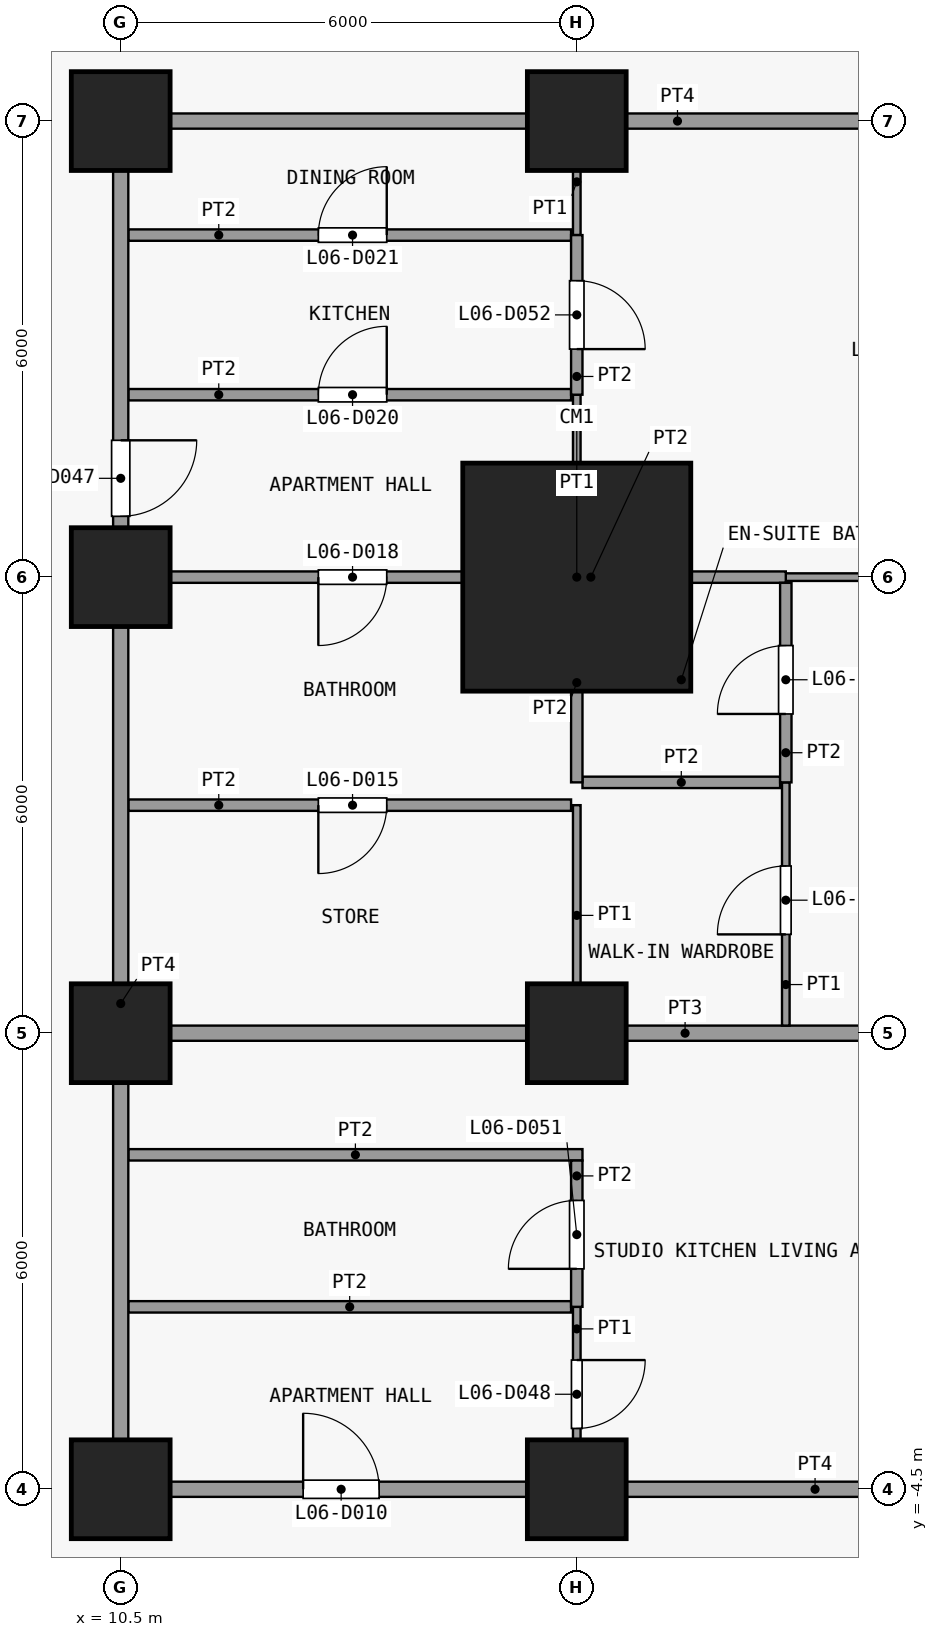
"""IFC4 building model, lengths in metres.
Left out: names, types, materials, properties, quantities, classifications, styles, units other than length and angle.
Written with IfcOpenShell. Run it as: python <this file> out.ifc"""

import sys

from ifc_helpers import new_model, si_unit, direction, frame, frame_2d, origin, origin_2d, place, context, subcontext, project, spatial, rectangle, extrude, element, fill, save


model = new_model("IFC4")
c1 = context("Model", 3, precision=1e-05, world=origin(), true_north=direction((0.0, 1.0)))
c2 = subcontext(c1, "Body", "Model", "MODEL_VIEW")
j1 = project(units=[si_unit("LENGTHUNIT", "METRE"), si_unit("PLANEANGLEUNIT", "RADIAN")], contexts=[c1])
p1 = place(None, origin())
s1 = spatial("IfcSite", under=j1, at=p1, CompositionType="ELEMENT")
p2 = place(p1, origin())
s2 = spatial("IfcBuilding", under=s1, at=p2, CompositionType="ELEMENT")
p3 = place(p2, frame((0.0, 0.0, 32.5)))
s3 = spatial("IfcBuildingStorey", under=s2, at=p3, CompositionType="ELEMENT", Elevation=32.5)
for number, where, z_axis, x_axis in (
    (1, (10.5, -4.5, 0.0), (0.0, 0.0, 1.0), (1.0, 0.0, 0.0)),
    (2, (10.5, 1.5, 0.0), (0.0, 0.0, 1.0), (1.0, 0.0, 0.0)),
    (3, (10.5, 7.5, 0.0), (0.0, 0.0, 1.0), (1.0, 0.0, 0.0)),
    (4, (10.5, 13.5, 0.0), (0.0, 0.0, 1.0), (1.0, 0.0, 0.0)),
    (5, (16.5, -4.5, 0.0), (0.0, 0.0, 1.0), (1.0, 0.0, 0.0)),
    (6, (16.5, 1.5, 0.0), (0.0, 0.0, 1.0), (1.0, 0.0, 0.0)),
):
    element("IfcColumn", number, at=place(p3, frame(where, z_axis=z_axis, x_axis=x_axis)), inside=s3, PredefinedType="COLUMN", context=c2, shape_type="SweptSolid", body=[
        extrude(rectangle(XDim=1.3, YDim=1.3, at=origin_2d()), origin(), (0.0, 0.0, 1.0), 3.6),
    ])
p4 = place(p3, frame((16.5, 7.5, 0.0), z_axis=(0.0, 0.0, 1.0), x_axis=(1.0, 0.0, 0.0)))
e7 = element("IfcColumn", 7, at=p4, inside=s3, PredefinedType="COLUMN", context=c2, shape_type="SweptSolid", body=[
    extrude(rectangle(XDim=3.0, YDim=3.0, at=origin_2d()), origin(), (0.0, 0.0, 1.0), 3.6),
])
p5 = place(p3, frame((16.5, 13.5, 0.0), z_axis=(0.0, 0.0, 1.0), x_axis=(1.0, 0.0, 0.0)))
e8 = element("IfcColumn", 8, at=p5, inside=s3, PredefinedType="COLUMN", context=c2, shape_type="SweptSolid", body=[
    extrude(rectangle(XDim=1.3, YDim=1.3, at=origin_2d()), origin(), (0.0, 0.0, 1.0), 3.6),
])
p6 = place(p3, frame((10.4, -4.5, 0.0), z_axis=(0.0, 0.0, 1.0), x_axis=(1.0, 0.0, 0.0)))
e9 = element("IfcWall", 9, at=p6, inside=s3, PredefinedType="PARTITIONING", context=c2, shape_type="SweptSolid", body=[
    extrude(rectangle(XDim=14.85, YDim=0.2, at=frame_2d((7.425, 0.0))), origin(), (0.0, 0.0, 1.0), 3.3),
])
p7 = place(p6, frame((2.5, 0.0, 0.0)))
e10 = element("IfcOpeningElement", 10, at=p7, cuts=e9, PredefinedType="OPENING", context=c2, shape_type="SweptSolid", body=[
    extrude(rectangle(XDim=1.0, YDim=2.1, at=frame_2d((0.5, 1.05))), frame((0.0, 0.11, 0.0), z_axis=(0.0, -1.0, 0.0), x_axis=(1.0, 0.0, 0.0)), (0.0, 0.0, 1.0), 0.22),
])
p8 = place(p3, frame((10.6, -2.1, 0.0), z_axis=(0.0, 0.0, 1.0), x_axis=(1.0, 0.0, 0.0)))
e11 = element("IfcWall", 11, at=p8, inside=s3, PredefinedType="PARTITIONING", context=c2, shape_type="SweptSolid", body=[
    extrude(rectangle(XDim=5.825, YDim=0.15, at=frame_2d((2.913, 0.0))), origin(), (0.0, 0.0, 1.0), 3.3),
])
p9 = place(p3, frame((10.6, -0.1, 0.0), z_axis=(0.0, 0.0, 1.0), x_axis=(1.0, 0.0, 0.0)))
e12 = element("IfcWall", 12, at=p9, inside=s3, PredefinedType="PARTITIONING", context=c2, shape_type="SweptSolid", body=[
    extrude(rectangle(XDim=5.975, YDim=0.15, at=frame_2d((2.987, 0.0))), origin(), (0.0, 0.0, 1.0), 3.3),
])
p10 = place(p3, frame((10.6, 1.5, 0.0), z_axis=(0.0, 0.0, 1.0), x_axis=(1.0, 0.0, 0.0)))
e13 = element("IfcWall", 13, at=p10, inside=s3, PredefinedType="PARTITIONING", context=c2, shape_type="SweptSolid", body=[
    extrude(rectangle(XDim=14.65, YDim=0.2, at=frame_2d((7.325, 0.0))), origin(), (0.0, 0.0, 1.0), 3.3),
])
p11 = place(p3, frame((10.6, 4.5, 0.0), z_axis=(0.0, 0.0, 1.0), x_axis=(1.0, 0.0, 0.0)))
e14 = element("IfcWall", 14, at=p11, inside=s3, PredefinedType="PARTITIONING", context=c2, shape_type="SweptSolid", body=[
    extrude(rectangle(XDim=5.825, YDim=0.15, at=frame_2d((2.913, 0.0))), origin(), (0.0, 0.0, 1.0), 3.3),
])
p12 = place(p11, frame((2.5, 0.0, 0.0)))
e15 = element("IfcOpeningElement", 15, at=p12, cuts=e14, PredefinedType="OPENING", context=c2, shape_type="SweptSolid", body=[
    extrude(rectangle(XDim=0.9, YDim=2.1, at=frame_2d((0.45, 1.05))), frame((0.0, 0.085, 0.0), z_axis=(0.0, -1.0, 0.0), x_axis=(1.0, 0.0, 0.0)), (0.0, 0.0, 1.0), 0.17),
])
p13 = place(p3, frame((16.575, 4.8, 0.0), z_axis=(0.0, 0.0, 1.0), x_axis=(1.0, 0.0, 0.0)))
e16 = element("IfcWall", 16, at=p13, inside=s3, PredefinedType="PARTITIONING", context=c2, shape_type="SweptSolid", body=[
    extrude(rectangle(XDim=2.6, YDim=0.15, at=frame_2d((1.3, 0.0))), origin(), (0.0, 0.0, 1.0), 3.3),
])
p14 = place(p3, frame((19.25, 7.5, 0.0), z_axis=(0.0, 0.0, 1.0), x_axis=(1.0, 0.0, 0.0)))
e17 = element("IfcWall", 17, at=p14, inside=s3, PredefinedType="PARTITIONING", context=c2, shape_type="SweptSolid", body=[
    extrude(rectangle(XDim=6.0, YDim=0.1, at=frame_2d((3.0, 0.0))), origin(), (0.0, 0.0, 1.0), 3.3),
])
p15 = place(p14, frame((1.7, 0.0, 0.0)))
e18 = element("IfcOpeningElement", 18, at=p15, cuts=e17, PredefinedType="OPENING", context=c2, shape_type="SweptSolid", body=[
    extrude(rectangle(XDim=0.9, YDim=2.1, at=frame_2d((0.45, 1.05))), frame((0.0, 0.06, 0.0), z_axis=(0.0, -1.0, 0.0), x_axis=(1.0, 0.0, 0.0)), (0.0, 0.0, 1.0), 0.12),
])
p16 = place(p3, frame((10.6, 7.5, 0.0), z_axis=(0.0, 0.0, 1.0), x_axis=(1.0, 0.0, 0.0)))
e19 = element("IfcWall", 19, at=p16, inside=s3, PredefinedType="PARTITIONING", context=c2, shape_type="SweptSolid", body=[
    extrude(rectangle(XDim=8.65, YDim=0.15, at=frame_2d((4.325, 0.0))), origin(), (0.0, 0.0, 1.0), 3.3),
])
p17 = place(p16, frame((2.5, 0.0, 0.0)))
e20 = element("IfcOpeningElement", 20, at=p17, cuts=e19, PredefinedType="OPENING", context=c2, shape_type="SweptSolid", body=[
    extrude(rectangle(XDim=0.9, YDim=2.1, at=frame_2d((0.45, 1.05))), frame((0.0, 0.085, 0.0), z_axis=(0.0, -1.0, 0.0), x_axis=(1.0, 0.0, 0.0)), (0.0, 0.0, 1.0), 0.17),
])
p18 = place(p3, frame((10.6, 9.9, 0.0), z_axis=(0.0, 0.0, 1.0), x_axis=(1.0, 0.0, 0.0)))
e21 = element("IfcWall", 21, at=p18, inside=s3, PredefinedType="PARTITIONING", context=c2, shape_type="SweptSolid", body=[
    extrude(rectangle(XDim=5.825, YDim=0.15, at=frame_2d((2.913, 0.0))), origin(), (0.0, 0.0, 1.0), 3.3),
])
p19 = place(p18, frame((2.5, 0.0, 0.0)))
e22 = element("IfcOpeningElement", 22, at=p19, cuts=e21, PredefinedType="OPENING", context=c2, shape_type="SweptSolid", body=[
    extrude(rectangle(XDim=0.9, YDim=2.1, at=frame_2d((0.45, 1.05))), frame((0.0, 0.085, 0.0), z_axis=(0.0, -1.0, 0.0), x_axis=(1.0, 0.0, 0.0)), (0.0, 0.0, 1.0), 0.17),
])
p20 = place(p3, frame((10.6, 12.0, 0.0), z_axis=(0.0, 0.0, 1.0), x_axis=(1.0, 0.0, 0.0)))
e23 = element("IfcWall", 23, at=p20, inside=s3, PredefinedType="PARTITIONING", context=c2, shape_type="SweptSolid", body=[
    extrude(rectangle(XDim=5.825, YDim=0.15, at=frame_2d((2.913, 0.0))), origin(), (0.0, 0.0, 1.0), 3.3),
])
p21 = place(p20, frame((2.5, 0.0, 0.0)))
e24 = element("IfcOpeningElement", 24, at=p21, cuts=e23, PredefinedType="OPENING", context=c2, shape_type="SweptSolid", body=[
    extrude(rectangle(XDim=0.9, YDim=2.1, at=frame_2d((0.45, 1.05))), frame((0.0, 0.085, 0.0), z_axis=(0.0, -1.0, 0.0), x_axis=(1.0, 0.0, 0.0)), (0.0, 0.0, 1.0), 0.17),
])
p22 = place(p3, frame((10.4, 13.5, 0.0), z_axis=(0.0, 0.0, 1.0), x_axis=(1.0, 0.0, 0.0)))
e25 = element("IfcWall", 25, at=p22, inside=s3, PredefinedType="PARTITIONING", context=c2, shape_type="SweptSolid", body=[
    extrude(rectangle(XDim=14.85, YDim=0.2, at=frame_2d((7.425, 0.0))), origin(), (0.0, 0.0, 1.0), 3.3),
])
p23 = place(p3, frame((10.5, -4.4, 0.0), z_axis=(0.0, 0.0, 1.0), x_axis=(0.0, 1.0, 0.0)))
e26 = element("IfcWall", 26, at=p23, inside=s3, PredefinedType="PARTITIONING", context=c2, shape_type="SweptSolid", body=[
    extrude(rectangle(XDim=17.8, YDim=0.2, at=frame_2d((8.9, 0.0))), origin(), (0.0, 0.0, 1.0), 3.3),
])
p24 = place(p23, frame((12.7, 0.0, 0.0)))
e27 = element("IfcOpeningElement", 27, at=p24, cuts=e26, PredefinedType="OPENING", context=c2, shape_type="SweptSolid", body=[
    extrude(rectangle(XDim=1.0, YDim=2.1, at=frame_2d((0.5, 1.05))), frame((0.0, 0.11, 0.0), z_axis=(0.0, -1.0, 0.0), x_axis=(1.0, 0.0, 0.0)), (0.0, 0.0, 1.0), 0.22),
])
p25 = place(p3, frame((16.5, -4.4, 0.0), z_axis=(0.0, 0.0, 1.0), x_axis=(0.0, 1.0, 0.0)))
e28 = element("IfcWall", 28, at=p25, inside=s3, PredefinedType="PARTITIONING", context=c2, shape_type="SweptSolid", body=[
    extrude(rectangle(XDim=2.3, YDim=0.1, at=frame_2d((1.15, 0.0))), origin(), (0.0, 0.0, 1.0), 3.3),
])
p26 = place(p25, frame((0.7, 0.0, 0.0)))
e29 = element("IfcOpeningElement", 29, at=p26, cuts=e28, PredefinedType="OPENING", context=c2, shape_type="SweptSolid", body=[
    extrude(rectangle(XDim=0.9, YDim=2.1, at=frame_2d((0.45, 1.05))), frame((0.0, 0.06, 0.0), z_axis=(0.0, -1.0, 0.0), x_axis=(1.0, 0.0, 0.0)), (0.0, 0.0, 1.0), 0.12),
])
p27 = place(p3, frame((16.5, 1.6, 0.0), z_axis=(0.0, 0.0, 1.0), x_axis=(0.0, 1.0, 0.0)))
e30 = element("IfcWall", 30, at=p27, inside=s3, PredefinedType="PARTITIONING", context=c2, shape_type="SweptSolid", body=[
    extrude(rectangle(XDim=2.9, YDim=0.1, at=frame_2d((1.45, 0.0))), origin(), (0.0, 0.0, 1.0), 3.3),
])
p28 = place(p3, frame((16.5, 7.575, 0.0), z_axis=(0.0, 0.0, 1.0), x_axis=(0.0, 1.0, 0.0)))
e31 = element("IfcWall", 31, at=p28, inside=s3, PredefinedType="PARTITIONING", context=c2, shape_type="SweptSolid", body=[
    extrude(rectangle(XDim=2.325, YDim=0.1, at=frame_2d((1.163, 0.0))), origin(), (0.0, 0.0, 1.0), 3.3),
])
p29 = place(p3, frame((16.5, 12.0, 0.0), z_axis=(0.0, 0.0, 1.0), x_axis=(0.0, 1.0, 0.0)))
e32 = element("IfcWall", 32, at=p29, inside=s3, PredefinedType="PARTITIONING", context=c2, shape_type="SweptSolid", body=[
    extrude(rectangle(XDim=1.4, YDim=0.1, at=frame_2d((0.7, 0.0))), origin(), (0.0, 0.0, 1.0), 3.3),
])
p30 = place(p3, frame((16.5, -2.1, 0.0), z_axis=(0.0, 0.0, 1.0), x_axis=(0.0, 1.0, 0.0)))
e33 = element("IfcWall", 33, at=p30, inside=s3, PredefinedType="PARTITIONING", context=c2, shape_type="SweptSolid", body=[
    extrude(rectangle(XDim=1.925, YDim=0.15, at=frame_2d((0.962, 0.0))), origin(), (0.0, 0.0, 1.0), 3.3),
])
p31 = place(p30, frame((0.5, 0.0, 0.0)))
e34 = element("IfcOpeningElement", 34, at=p31, cuts=e33, PredefinedType="OPENING", context=c2, shape_type="SweptSolid", body=[
    extrude(rectangle(XDim=0.9, YDim=2.1, at=frame_2d((0.45, 1.05))), frame((0.0, 0.085, 0.0), z_axis=(0.0, -1.0, 0.0), x_axis=(1.0, 0.0, 0.0)), (0.0, 0.0, 1.0), 0.17),
])
p32 = place(p3, frame((16.5, 4.8, 0.0), z_axis=(0.0, 0.0, 1.0), x_axis=(0.0, 1.0, 0.0)))
e35 = element("IfcWall", 35, at=p32, inside=s3, PredefinedType="PARTITIONING", context=c2, shape_type="SweptSolid", body=[
    extrude(rectangle(XDim=2.625, YDim=0.15, at=frame_2d((1.312, 0.0))), origin(), (0.0, 0.0, 1.0), 3.3),
])
p33 = place(p3, frame((16.5, 9.9, 0.0), z_axis=(0.0, 0.0, 1.0), x_axis=(0.0, 1.0, 0.0)))
e36 = element("IfcWall", 36, at=p33, inside=s3, PredefinedType="PARTITIONING", context=c2, shape_type="SweptSolid", body=[
    extrude(rectangle(XDim=2.1, YDim=0.15, at=frame_2d((1.05, 0.0))), origin(), (0.0, 0.0, 1.0), 3.3),
])
p34 = place(p33, frame((0.6, 0.0, 0.0)))
e37 = element("IfcOpeningElement", 37, at=p34, cuts=e36, PredefinedType="OPENING", context=c2, shape_type="SweptSolid", body=[
    extrude(rectangle(XDim=0.9, YDim=2.1, at=frame_2d((0.45, 1.05))), frame((0.0, 0.085, 0.0), z_axis=(0.0, -1.0, 0.0), x_axis=(1.0, 0.0, 0.0)), (0.0, 0.0, 1.0), 0.17),
])
p35 = place(p3, frame((19.25, 1.6, 0.0), z_axis=(0.0, 0.0, 1.0), x_axis=(0.0, 1.0, 0.0)))
e38 = element("IfcWall", 38, at=p35, inside=s3, PredefinedType="PARTITIONING", context=c2, shape_type="SweptSolid", body=[
    extrude(rectangle(XDim=3.2, YDim=0.1, at=frame_2d((1.6, 0.0))), origin(), (0.0, 0.0, 1.0), 3.3),
])
p36 = place(p35, frame((1.2, 0.0, 0.0)))
e39 = element("IfcOpeningElement", 39, at=p36, cuts=e38, PredefinedType="OPENING", context=c2, shape_type="SweptSolid", body=[
    extrude(rectangle(XDim=0.9, YDim=2.1, at=frame_2d((0.45, 1.05))), frame((0.0, 0.06, 0.0), z_axis=(0.0, -1.0, 0.0), x_axis=(1.0, 0.0, 0.0)), (0.0, 0.0, 1.0), 0.12),
])
p37 = place(p3, frame((19.25, 4.8, 0.0), z_axis=(0.0, 0.0, 1.0), x_axis=(0.0, 1.0, 0.0)))
e40 = element("IfcWall", 40, at=p37, inside=s3, PredefinedType="PARTITIONING", context=c2, shape_type="SweptSolid", body=[
    extrude(rectangle(XDim=2.625, YDim=0.15, at=frame_2d((1.312, 0.0))), origin(), (0.0, 0.0, 1.0), 3.3),
])
p38 = place(p37, frame((0.9, 0.0, 0.0)))
e41 = element("IfcOpeningElement", 41, at=p38, cuts=e40, PredefinedType="OPENING", context=c2, shape_type="SweptSolid", body=[
    extrude(rectangle(XDim=0.9, YDim=2.1, at=frame_2d((0.45, 1.05))), frame((0.0, 0.085, 0.0), z_axis=(0.0, -1.0, 0.0), x_axis=(1.0, 0.0, 0.0)), (0.0, 0.0, 1.0), 0.17),
])
p39 = place(p7, origin())
e42 = element("IfcDoor", 42, at=p39, inside=s3, OperationType="SINGLE_SWING_RIGHT", PredefinedType="DOOR", context=c2, shape_type="SweptSolid", body=[
    extrude(rectangle(XDim=1.0, YDim=2.1, at=frame_2d((0.5, 1.05))), frame((0.0, 0.025, 0.0), z_axis=(0.0, -1.0, 0.0), x_axis=(1.0, 0.0, 0.0)), (0.0, 0.0, 1.0), 0.05),
])
fill(e10, e42)
p40 = place(p12, origin())
e43 = element("IfcDoor", 43, at=p40, inside=s3, OperationType="SINGLE_SWING_LEFT", PredefinedType="DOOR", context=c2, shape_type="SweptSolid", body=[
    extrude(rectangle(XDim=0.9, YDim=2.1, at=frame_2d((0.45, 1.05))), frame((0.0, 0.025, 0.0), z_axis=(0.0, -1.0, 0.0), x_axis=(1.0, 0.0, 0.0)), (0.0, 0.0, 1.0), 0.05),
])
fill(e15, e43)
p41 = place(p17, origin())
e44 = element("IfcDoor", 44, at=p41, inside=s3, OperationType="SINGLE_SWING_LEFT", PredefinedType="DOOR", context=c2, shape_type="SweptSolid", body=[
    extrude(rectangle(XDim=0.9, YDim=2.1, at=frame_2d((0.45, 1.05))), frame((0.0, 0.025, 0.0), z_axis=(0.0, -1.0, 0.0), x_axis=(1.0, 0.0, 0.0)), (0.0, 0.0, 1.0), 0.05),
])
fill(e20, e44)
p42 = place(p19, origin())
e45 = element("IfcDoor", 45, at=p42, inside=s3, OperationType="SINGLE_SWING_LEFT", PredefinedType="DOOR", context=c2, shape_type="SweptSolid", body=[
    extrude(rectangle(XDim=0.9, YDim=2.1, at=frame_2d((0.45, 1.05))), frame((0.0, 0.025, 0.0), z_axis=(0.0, -1.0, 0.0), x_axis=(1.0, 0.0, 0.0)), (0.0, 0.0, 1.0), 0.05),
])
fill(e22, e45)
p43 = place(p21, origin())
e46 = element("IfcDoor", 46, at=p43, inside=s3, OperationType="SINGLE_SWING_LEFT", PredefinedType="DOOR", context=c2, shape_type="SweptSolid", body=[
    extrude(rectangle(XDim=0.9, YDim=2.1, at=frame_2d((0.45, 1.05))), frame((0.0, 0.025, 0.0), z_axis=(0.0, -1.0, 0.0), x_axis=(1.0, 0.0, 0.0)), (0.0, 0.0, 1.0), 0.05),
])
fill(e24, e46)
p44 = place(p24, origin())
e47 = element("IfcDoor", 47, at=p44, inside=s3, OperationType="SINGLE_SWING_RIGHT", PredefinedType="DOOR", context=c2, shape_type="SweptSolid", body=[
    extrude(rectangle(XDim=1.0, YDim=2.1, at=frame_2d((0.5, 1.05))), frame((0.0, 0.025, 0.0), z_axis=(0.0, -1.0, 0.0), x_axis=(1.0, 0.0, 0.0)), (0.0, 0.0, 1.0), 0.05),
])
fill(e27, e47)
p45 = place(p26, origin())
e48 = element("IfcDoor", 48, at=p45, inside=s3, OperationType="SINGLE_SWING_RIGHT", PredefinedType="DOOR", context=c2, shape_type="SweptSolid", body=[
    extrude(rectangle(XDim=0.9, YDim=2.1, at=frame_2d((0.45, 1.05))), frame((0.0, 0.025, 0.0), z_axis=(0.0, -1.0, 0.0), x_axis=(1.0, 0.0, 0.0)), (0.0, 0.0, 1.0), 0.05),
])
fill(e29, e48)
p46 = place(p31, origin())
e49 = element("IfcDoor", 49, at=p46, inside=s3, OperationType="SINGLE_SWING_RIGHT", PredefinedType="DOOR", context=c2, shape_type="SweptSolid", body=[
    extrude(rectangle(XDim=0.9, YDim=2.1, at=frame_2d((0.45, 1.05))), frame((0.0, 0.025, 0.0), z_axis=(0.0, -1.0, 0.0), x_axis=(1.0, 0.0, 0.0)), (0.0, 0.0, 1.0), 0.05),
])
fill(e34, e49)
p47 = place(p34, origin())
e50 = element("IfcDoor", 50, at=p47, inside=s3, OperationType="SINGLE_SWING_LEFT", PredefinedType="DOOR", context=c2, shape_type="SweptSolid", body=[
    extrude(rectangle(XDim=0.9, YDim=2.1, at=frame_2d((0.45, 1.05))), frame((0.0, 0.025, 0.0), z_axis=(0.0, -1.0, 0.0), x_axis=(1.0, 0.0, 0.0)), (0.0, 0.0, 1.0), 0.05),
])
fill(e37, e50)
p48 = place(p36, origin())
e51 = element("IfcDoor", 51, at=p48, inside=s3, OperationType="SINGLE_SWING_RIGHT", PredefinedType="DOOR", context=c2, shape_type="SweptSolid", body=[
    extrude(rectangle(XDim=0.9, YDim=2.1, at=frame_2d((0.45, 1.05))), frame((0.0, 0.025, 0.0), z_axis=(0.0, -1.0, 0.0), x_axis=(1.0, 0.0, 0.0)), (0.0, 0.0, 1.0), 0.05),
])
fill(e39, e51)
p49 = place(p38, origin())
e52 = element("IfcDoor", 52, at=p49, inside=s3, OperationType="SINGLE_SWING_RIGHT", PredefinedType="DOOR", context=c2, shape_type="SweptSolid", body=[
    extrude(rectangle(XDim=0.9, YDim=2.1, at=frame_2d((0.45, 1.05))), frame((0.0, 0.025, 0.0), z_axis=(0.0, -1.0, 0.0), x_axis=(1.0, 0.0, 0.0)), (0.0, 0.0, 1.0), 0.05),
])
fill(e41, e52)
save(model, sys.argv[1])
